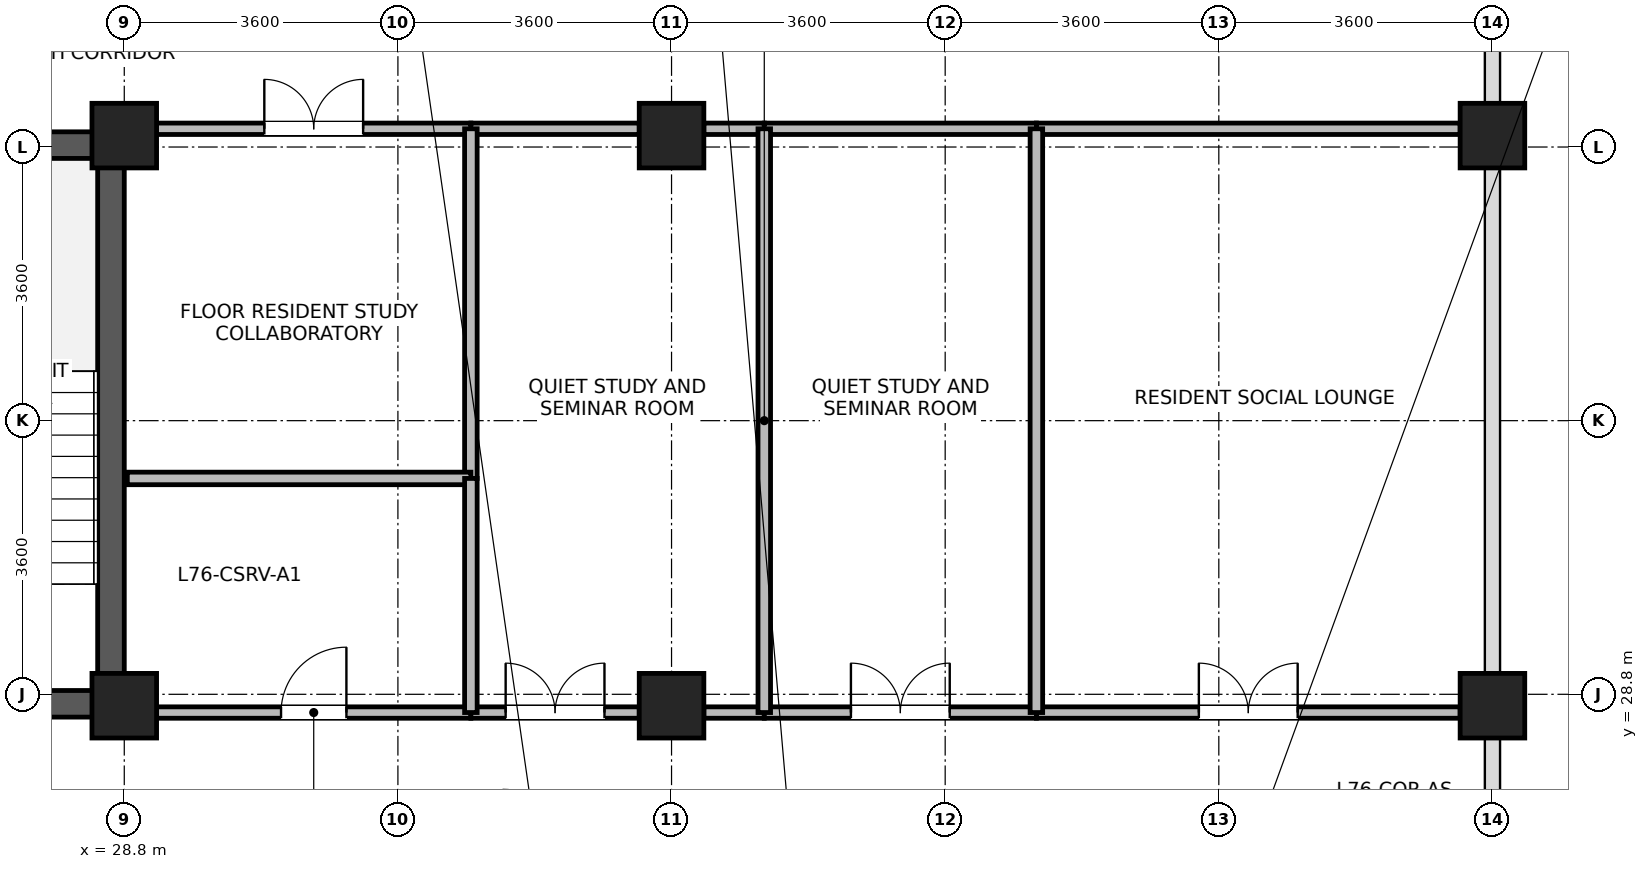
"""IFC4 building model, lengths in metres.
Left out: names, types, materials, properties, quantities, classifications, styles, units other than length and angle.
Written with IfcOpenShell. Run it as: python <this file> out.ifc"""

import sys

from ifc_helpers import new_model, si_unit, direction, frame, frame_2d, origin, origin_2d, place, context, subcontext, project, spatial, rectangle, extrude, source, transform, mapped, element, fill, save


model = new_model("IFC4")
c1 = context("Model", 3, precision=1e-05, world=origin(), true_north=direction((0.0, 1.0)))
c2 = subcontext(c1, "Body", "Model", "MODEL_VIEW")
j1 = project(units=[si_unit("LENGTHUNIT", "METRE"), si_unit("PLANEANGLEUNIT", "RADIAN")], contexts=[c1])
p1 = place(None, origin())
s1 = spatial("IfcSite", under=j1, at=p1, CompositionType="ELEMENT")
p2 = place(p1, origin())
s2 = spatial("IfcBuilding", under=s1, at=p2, CompositionType="ELEMENT")
p3 = place(p2, frame((0.0, 0.0, 294.3)))
s3 = spatial("IfcBuildingStorey", under=s2, at=p3, CompositionType="ELEMENT", Elevation=294.3)
p4 = place(p3, frame((28.625, 28.5, 0.0), z_axis=(0.0, 0.0, 1.0), x_axis=(0.0, 1.0, 0.0)))
e1 = element("IfcWall", 1, at=p4, inside=s3, PredefinedType="SHEAR", context=c2, shape_type="SweptSolid", body=[
    extrude(rectangle(XDim=7.7, YDim=0.35, at=frame_2d((3.85, 0.0))), origin(), (0.0, 0.0, 1.0), 3.4),
])
for number, where, z_axis, x_axis in (
    (2, (25.25, 28.675, 0.0), (0.0, 0.0, 1.0), (1.0, 0.0, 0.0)),
    (3, (25.25, 36.025, 0.0), (0.0, 0.0, 1.0), (1.0, 0.0, 0.0)),
):
    element("IfcWall", number, at=place(p3, frame(where, z_axis=z_axis, x_axis=x_axis)), inside=s3, PredefinedType="SHEAR", context=c2, shape_type="SweptSolid", body=[
        extrude(rectangle(XDim=3.2, YDim=0.35, at=frame_2d((1.6, 0.0))), origin(), (0.0, 0.0, 1.0), 3.4),
    ])
m1 = source(origin(), c2, "Body", "SweptSolid", [
    extrude(rectangle(XDim=0.85, YDim=0.85, at=origin_2d()), origin(), (0.0, 0.0, 1.0), 3.7),
])
for number, where, z_axis, x_axis in (
    (4, (28.8, 28.65, 0.0), (0.0, 0.0, 1.0), (1.0, 0.0, 0.0)),
    (5, (28.8, 36.15, 0.0), (0.0, 0.0, 1.0), (1.0, 0.0, 0.0)),
    (6, (36.0, 28.65, 0.0), (0.0, 0.0, 1.0), (1.0, 0.0, 0.0)),
    (7, (36.0, 36.15, 0.0), (0.0, 0.0, 1.0), (1.0, 0.0, 0.0)),
    (8, (46.8, 28.65, 0.0), (0.0, 0.0, 1.0), (1.0, 0.0, 0.0)),
    (9, (46.8, 36.15, 0.0), (0.0, 0.0, 1.0), (1.0, 0.0, 0.0)),
):
    element("IfcColumn", number, at=place(p3, frame(where, z_axis=z_axis, x_axis=x_axis)), inside=s3, PredefinedType="COLUMN", context=c2, shape_type="MappedRepresentation", body=[
        mapped(m1, transform((0.0, 0.0, 0.0), x_axis=(1.0, 0.0, 0.0), y_axis=(0.0, 1.0, 0.0), z_axis=(0.0, 0.0, 1.0), scale=1.0)),
    ])
p5 = place(p3, frame((40.8, 28.56, 0.0), z_axis=(0.0, 0.0, 1.0), x_axis=(1.0, 0.0, 0.0)))
e10 = element("IfcWall", 10, at=p5, inside=s3, PredefinedType="PARTITIONING", context=c2, shape_type="SweptSolid", body=[
    extrude(rectangle(XDim=5.575, YDim=0.15, at=frame_2d((2.788, 0.0))), origin(), (0.0, 0.0, 1.0), 2.83),
])
p6 = place(p5, frame((2.137, 0.0, 0.0)))
e11 = element("IfcOpeningElement", 11, at=p6, cuts=e10, PredefinedType="OPENING", context=c2, shape_type="SweptSolid", body=[
    extrude(rectangle(XDim=1.3, YDim=2.12, at=frame_2d((0.65, 1.06))), frame((0.0, 0.085, 0.0), z_axis=(0.0, -1.0, 0.0), x_axis=(1.0, 0.0, 0.0)), (0.0, 0.0, 1.0), 0.17),
])
p7 = place(p3, frame((40.8, 36.24, 0.0), z_axis=(0.0, 0.0, 1.0), x_axis=(1.0, 0.0, 0.0)))
e12 = element("IfcWall", 12, at=p7, inside=s3, PredefinedType="PARTITIONING", context=c2, shape_type="SweptSolid", body=[
    extrude(rectangle(XDim=5.575, YDim=0.15, at=frame_2d((2.788, 0.0))), origin(), (0.0, 0.0, 1.0), 2.83),
])
p8 = place(p3, frame((29.225, 28.56, 0.0), z_axis=(0.0, 0.0, 1.0), x_axis=(1.0, 0.0, 0.0)))
e13 = element("IfcWall", 13, at=p8, inside=s3, PredefinedType="PARTITIONING", context=c2, shape_type="SweptSolid", body=[
    extrude(rectangle(XDim=4.135, YDim=0.15, at=frame_2d((2.067, 0.0))), origin(), (0.0, 0.0, 1.0), 2.83),
])
p9 = place(p8, frame((1.637, 0.0, 0.0)))
e14 = element("IfcOpeningElement", 14, at=p9, cuts=e13, PredefinedType="OPENING", context=c2, shape_type="SweptSolid", body=[
    extrude(rectangle(XDim=0.86, YDim=2.02, at=frame_2d((0.43, 1.01))), frame((0.0, 0.085, 0.0), z_axis=(0.0, -1.0, 0.0), x_axis=(1.0, 0.0, 0.0)), (0.0, 0.0, 1.0), 0.17),
])
p10 = place(p3, frame((29.225, 36.24, 0.0), z_axis=(0.0, 0.0, 1.0), x_axis=(1.0, 0.0, 0.0)))
e15 = element("IfcWall", 15, at=p10, inside=s3, PredefinedType="PARTITIONING", context=c2, shape_type="SweptSolid", body=[
    extrude(rectangle(XDim=4.135, YDim=0.15, at=frame_2d((2.067, 0.0))), origin(), (0.0, 0.0, 1.0), 2.83),
])
p11 = place(p10, frame((1.417, 0.0, 0.0)))
e16 = element("IfcOpeningElement", 16, at=p11, cuts=e15, PredefinedType="OPENING", context=c2, shape_type="SweptSolid", body=[
    extrude(rectangle(XDim=1.3, YDim=2.12, at=frame_2d((0.65, 1.06))), frame((0.0, 0.085, 0.0), z_axis=(0.0, -1.0, 0.0), x_axis=(1.0, 0.0, 0.0)), (0.0, 0.0, 1.0), 0.17),
])
p12 = place(p3, frame((33.36, 28.56, 0.0), z_axis=(0.0, 0.0, 1.0), x_axis=(1.0, 0.0, 0.0)))
e17 = element("IfcWall", 17, at=p12, inside=s3, PredefinedType="PARTITIONING", context=c2, shape_type="SweptSolid", body=[
    extrude(rectangle(XDim=2.215, YDim=0.15, at=frame_2d((1.107, 0.0))), origin(), (0.0, 0.0, 1.0), 2.83),
])
p13 = place(p12, frame((0.458, 0.0, 0.0)))
e18 = element("IfcOpeningElement", 18, at=p13, cuts=e17, PredefinedType="OPENING", context=c2, shape_type="SweptSolid", body=[
    extrude(rectangle(XDim=1.3, YDim=2.12, at=frame_2d((0.65, 1.06))), frame((0.0, 0.085, 0.0), z_axis=(0.0, -1.0, 0.0), x_axis=(1.0, 0.0, 0.0)), (0.0, 0.0, 1.0), 0.17),
])
p14 = place(p3, frame((36.425, 28.56, 0.0), z_axis=(0.0, 0.0, 1.0), x_axis=(1.0, 0.0, 0.0)))
e19 = element("IfcWall", 19, at=p14, inside=s3, PredefinedType="PARTITIONING", context=c2, shape_type="SweptSolid", body=[
    extrude(rectangle(XDim=0.795, YDim=0.15, at=frame_2d((0.397, 0.0))), origin(), (0.0, 0.0, 1.0), 2.83),
])
p15 = place(p3, frame((33.36, 36.24, 0.0), z_axis=(0.0, 0.0, 1.0), x_axis=(1.0, 0.0, 0.0)))
e20 = element("IfcWall", 20, at=p15, inside=s3, PredefinedType="PARTITIONING", context=c2, shape_type="SweptSolid", body=[
    extrude(rectangle(XDim=2.215, YDim=0.15, at=frame_2d((1.107, 0.0))), origin(), (0.0, 0.0, 1.0), 2.83),
])
p16 = place(p3, frame((36.425, 36.24, 0.0), z_axis=(0.0, 0.0, 1.0), x_axis=(1.0, 0.0, 0.0)))
e21 = element("IfcWall", 21, at=p16, inside=s3, PredefinedType="PARTITIONING", context=c2, shape_type="SweptSolid", body=[
    extrude(rectangle(XDim=0.795, YDim=0.15, at=frame_2d((0.397, 0.0))), origin(), (0.0, 0.0, 1.0), 2.83),
])
p17 = place(p3, frame((37.22, 28.56, 0.0), z_axis=(0.0, 0.0, 1.0), x_axis=(1.0, 0.0, 0.0)))
e22 = element("IfcWall", 22, at=p17, inside=s3, PredefinedType="PARTITIONING", context=c2, shape_type="SweptSolid", body=[
    extrude(rectangle(XDim=3.58, YDim=0.15, at=frame_2d((1.79, 0.0))), origin(), (0.0, 0.0, 1.0), 2.83),
])
p18 = place(p17, frame((1.14, 0.0, 0.0)))
e23 = element("IfcOpeningElement", 23, at=p18, cuts=e22, PredefinedType="OPENING", context=c2, shape_type="SweptSolid", body=[
    extrude(rectangle(XDim=1.3, YDim=2.12, at=frame_2d((0.65, 1.06))), frame((0.0, 0.085, 0.0), z_axis=(0.0, -1.0, 0.0), x_axis=(1.0, 0.0, 0.0)), (0.0, 0.0, 1.0), 0.17),
])
p19 = place(p3, frame((37.22, 36.24, 0.0), z_axis=(0.0, 0.0, 1.0), x_axis=(1.0, 0.0, 0.0)))
e24 = element("IfcWall", 24, at=p19, inside=s3, PredefinedType="PARTITIONING", context=c2, shape_type="SweptSolid", body=[
    extrude(rectangle(XDim=3.58, YDim=0.15, at=frame_2d((1.79, 0.0))), origin(), (0.0, 0.0, 1.0), 2.83),
])
for number, where, z_axis, x_axis in (
    (25, (37.22, 28.56, 0.0), (0.0, 0.0, 1.0), (0.0, 1.0, 0.0)),
    (26, (40.8, 28.56, 0.0), (0.0, 0.0, 1.0), (0.0, 1.0, 0.0)),
):
    element("IfcWall", number, at=place(p3, frame(where, z_axis=z_axis, x_axis=x_axis)), inside=s3, PredefinedType="PARTITIONING", context=c2, shape_type="SweptSolid", body=[
        extrude(rectangle(XDim=7.68, YDim=0.165, at=frame_2d((3.84, 0.0))), origin(), (0.0, 0.0, 1.0), 3.38),
    ])
p20 = place(p3, frame((33.36, 31.64, 0.0), z_axis=(0.0, 0.0, 1.0), x_axis=(0.0, 1.0, 0.0)))
e27 = element("IfcWall", 27, at=p20, inside=s3, PredefinedType="PARTITIONING", context=c2, shape_type="SweptSolid", body=[
    extrude(rectangle(XDim=4.6, YDim=0.165, at=frame_2d((2.3, 0.0))), origin(), (0.0, 0.0, 1.0), 3.38),
])
p21 = place(p3, frame((28.84, 31.64, 0.0), z_axis=(0.0, 0.0, 1.0), x_axis=(1.0, 0.0, 0.0)))
e28 = element("IfcWall", 28, at=p21, inside=s3, PredefinedType="PARTITIONING", context=c2, shape_type="SweptSolid", body=[
    extrude(rectangle(XDim=4.52, YDim=0.165, at=frame_2d((2.26, 0.0))), origin(), (0.0, 0.0, 1.0), 3.38),
])
p22 = place(p3, frame((33.36, 28.56, 0.0), z_axis=(0.0, 0.0, 1.0), x_axis=(0.0, 1.0, 0.0)))
e29 = element("IfcWall", 29, at=p22, inside=s3, PredefinedType="PARTITIONING", context=c2, shape_type="SweptSolid", body=[
    extrude(rectangle(XDim=3.08, YDim=0.165, at=frame_2d((1.54, 0.0))), origin(), (0.0, 0.0, 1.0), 3.38),
])
p23 = place(p6, origin())
e30 = element("IfcDoor", 30, at=p23, inside=s3, OperationType="DOUBLE_DOOR_SINGLE_SWING", PredefinedType="DOOR", context=c2, shape_type="SweptSolid", body=[
    extrude(rectangle(XDim=1.3, YDim=2.12, at=frame_2d((0.65, 1.06))), frame((0.0, 0.025, 0.0), z_axis=(0.0, -1.0, 0.0), x_axis=(1.0, 0.0, 0.0)), (0.0, 0.0, 1.0), 0.05),
])
fill(e11, e30)
p24 = place(p9, origin())
e31 = element("IfcDoor", 31, at=p24, inside=s3, OperationType="SINGLE_SWING_RIGHT", PredefinedType="DOOR", context=c2, shape_type="SweptSolid", body=[
    extrude(rectangle(XDim=0.86, YDim=2.02, at=frame_2d((0.43, 1.01))), frame((0.0, 0.025, 0.0), z_axis=(0.0, -1.0, 0.0), x_axis=(1.0, 0.0, 0.0)), (0.0, 0.0, 1.0), 0.05),
])
fill(e14, e31)
p25 = place(p11, origin())
e32 = element("IfcDoor", 32, at=p25, inside=s3, OperationType="DOUBLE_DOOR_SINGLE_SWING", PredefinedType="DOOR", context=c2, shape_type="SweptSolid", body=[
    extrude(rectangle(XDim=1.3, YDim=2.12, at=frame_2d((0.65, 1.06))), frame((0.0, 0.025, 0.0), z_axis=(0.0, -1.0, 0.0), x_axis=(1.0, 0.0, 0.0)), (0.0, 0.0, 1.0), 0.05),
])
fill(e16, e32)
p26 = place(p13, origin())
e33 = element("IfcDoor", 33, at=p26, inside=s3, OperationType="DOUBLE_DOOR_SINGLE_SWING", PredefinedType="DOOR", context=c2, shape_type="SweptSolid", body=[
    extrude(rectangle(XDim=1.3, YDim=2.12, at=frame_2d((0.65, 1.06))), frame((0.0, 0.025, 0.0), z_axis=(0.0, -1.0, 0.0), x_axis=(1.0, 0.0, 0.0)), (0.0, 0.0, 1.0), 0.05),
])
fill(e18, e33)
p27 = place(p18, origin())
e34 = element("IfcDoor", 34, at=p27, inside=s3, OperationType="DOUBLE_DOOR_SINGLE_SWING", PredefinedType="DOOR", context=c2, shape_type="SweptSolid", body=[
    extrude(rectangle(XDim=1.3, YDim=2.12, at=frame_2d((0.65, 1.06))), frame((0.0, 0.025, 0.0), z_axis=(0.0, -1.0, 0.0), x_axis=(1.0, 0.0, 0.0)), (0.0, 0.0, 1.0), 0.05),
])
fill(e23, e34)
save(model, sys.argv[1])
